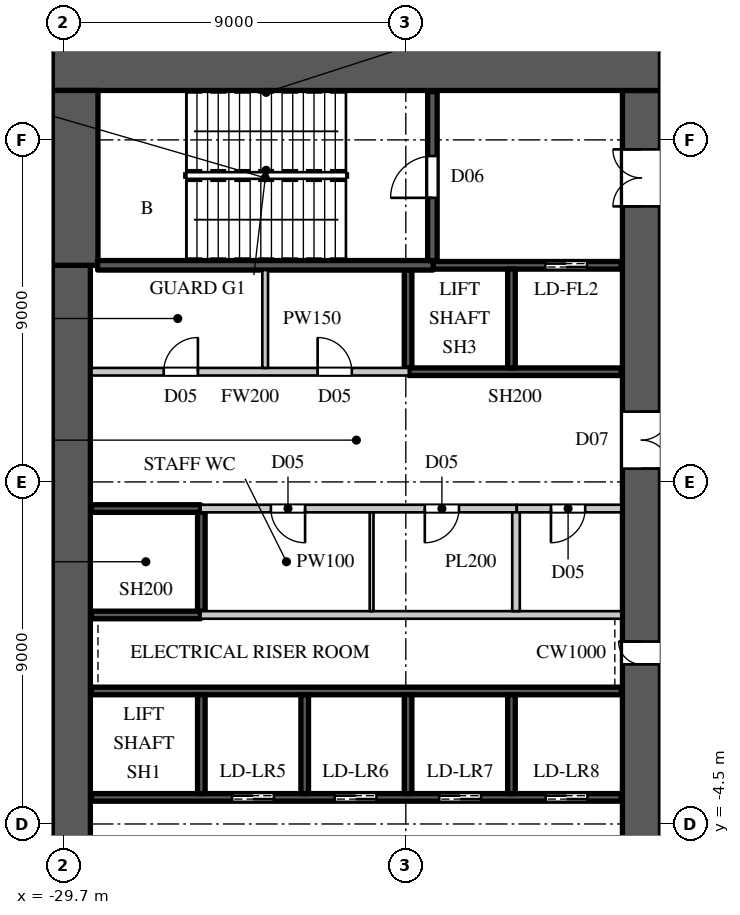
"""IFC4 building model, lengths in metres.
Left out: names, types, materials, properties, quantities, classifications, styles, units other than length and angle.
Written with IfcOpenShell. Run it as: python <this file> out.ifc"""

import sys

from ifc_helpers import new_model, si_unit, direction, frame, frame_2d, origin, place, context, subcontext, project, spatial, rectangle, extrude, element, fill, save


model = new_model("IFC4")
c1 = context("Model", 3, precision=1e-05, world=origin(), true_north=direction((0.0, 1.0)))
c2 = subcontext(c1, "Body", "Model", "MODEL_VIEW")
j1 = project(units=[si_unit("LENGTHUNIT", "METRE"), si_unit("PLANEANGLEUNIT", "RADIAN")], contexts=[c1])
p1 = place(None, origin())
s1 = spatial("IfcSite", under=j1, at=p1, CompositionType="ELEMENT")
p2 = place(p1, origin())
s2 = spatial("IfcBuilding", under=s1, at=p2, CompositionType="ELEMENT")
p3 = place(p2, frame((0.0, 0.0, 50.0)))
s3 = spatial("IfcBuildingStorey", under=s2, at=p3, CompositionType="ELEMENT", Elevation=50.0)
p4 = place(p3, frame((-30.0, 15.4, 0.0), z_axis=(0.0, 0.0, 1.0), x_axis=(1.0, 0.0, 0.0)))
e1 = element("IfcWall", 1, at=p4, inside=s3, PredefinedType="SHEAR", context=c2, shape_type="SweptSolid", body=[
    extrude(rectangle(XDim=16.0, YDim=1.2, at=frame_2d((8.0, 0.0))), origin(), (0.0, 0.0, 1.0), 5.5),
])
p5 = place(p3, frame((-14.5, -14.8, 0.0), z_axis=(0.0, 0.0, 1.0), x_axis=(0.0, 1.0, 0.0)))
e2 = element("IfcWall", 2, at=p5, inside=s3, PredefinedType="SHEAR", context=c2, shape_type="SweptSolid", body=[
    extrude(rectangle(XDim=29.6, YDim=1.0, at=frame_2d((14.8, 0.0))), origin(), (0.0, 0.0, 1.0), 5.5),
])
p6 = place(p5, frame((1.55, 0.0, 0.0)))
e3 = element("IfcOpeningElement", 3, at=p6, cuts=e2, PredefinedType="OPENING", context=c2, shape_type="SweptSolid", body=[
    extrude(rectangle(XDim=1.5, YDim=2.4, at=frame_2d((0.75, 1.2))), frame((0.0, 0.51, 0.0), z_axis=(0.0, -1.0, 0.0), x_axis=(1.0, 0.0, 0.0)), (0.0, 0.0, 1.0), 1.02),
])
p7 = place(p5, frame((26.55, 0.0, 0.0)))
e4 = element("IfcOpeningElement", 4, at=p7, cuts=e2, PredefinedType="OPENING", context=c2, shape_type="SweptSolid", body=[
    extrude(rectangle(XDim=1.5, YDim=2.4, at=frame_2d((0.75, 1.2))), frame((0.0, 0.51, 0.0), z_axis=(0.0, -1.0, 0.0), x_axis=(1.0, 0.0, 0.0)), (0.0, 0.0, 1.0), 1.02),
])
p8 = place(p5, frame((8.45, 0.0, 0.0)))
e5 = element("IfcOpeningElement", 5, at=p8, cuts=e2, PredefinedType="OPENING", context=c2, shape_type="SweptSolid", body=[
    extrude(rectangle(XDim=1.5, YDim=2.4, at=frame_2d((0.75, 1.2))), frame((0.0, 0.51, 0.0), z_axis=(0.0, -1.0, 0.0), x_axis=(1.0, 0.0, 0.0)), (0.0, 0.0, 1.0), 1.02),
])
p9 = place(p5, frame((19.65, 0.0, 0.0)))
e6 = element("IfcOpeningElement", 6, at=p9, cuts=e2, PredefinedType="OPENING", context=c2, shape_type="SweptSolid", body=[
    extrude(rectangle(XDim=1.5, YDim=2.4, at=frame_2d((0.75, 1.2))), frame((0.0, 0.51, 0.0), z_axis=(0.0, -1.0, 0.0), x_axis=(1.0, 0.0, 0.0)), (0.0, 0.0, 1.0), 1.02),
])
p10 = place(p5, frame((14.5, 0.0, 0.0)))
e7 = element("IfcOpeningElement", 7, at=p10, cuts=e2, PredefinedType="OPENING", context=c2, shape_type="SweptSolid", body=[
    extrude(rectangle(XDim=0.6, YDim=2.0, at=frame_2d((0.3, 1.0))), frame((0.0, 0.51, 0.0), z_axis=(0.0, -1.0, 0.0), x_axis=(1.0, 0.0, 0.0)), (0.0, 0.0, 1.0), 1.02),
])
p11 = place(p3, frame((-29.5, -10.2, 0.0), z_axis=(0.0, 0.0, 1.0), x_axis=(0.0, 1.0, 0.0)))
e8 = element("IfcWall", 8, at=p11, inside=s3, PredefinedType="SHEAR", context=c2, shape_type="SweptSolid", body=[
    extrude(rectangle(XDim=20.4, YDim=1.0, at=frame_2d((10.2, 0.0))), origin(), (0.0, 0.0, 1.0), 5.5),
])
p12 = place(p3, frame((-29.4, 10.2, 0.0), z_axis=(0.0, 0.0, 1.0), x_axis=(0.0, 1.0, 0.0)))
e9 = element("IfcWall", 9, at=p12, inside=s3, PredefinedType="SHEAR", context=c2, shape_type="SweptSolid", body=[
    extrude(rectangle(XDim=4.6, YDim=1.2, at=frame_2d((2.3, 0.0))), origin(), (0.0, 0.0, 1.0), 5.5),
])
p13 = place(p3, frame((-28.97, 7.4, 0.0), z_axis=(0.0, 0.0, 1.0), x_axis=(1.0, 0.0, 0.0)))
e10 = element("IfcWall", 10, at=p13, inside=s3, PredefinedType="PARTITIONING", context=c2, shape_type="SweptSolid", body=[
    extrude(rectangle(XDim=8.35, YDim=0.2, at=frame_2d((4.175, 0.0))), origin(), (0.0, 0.0, 1.0), 5.2),
])
p14 = place(p13, frame((1.9, 0.0, 0.0)))
e11 = element("IfcOpeningElement", 11, at=p14, cuts=e10, PredefinedType="OPENING", context=c2, shape_type="SweptSolid", body=[
    extrude(rectangle(XDim=0.9, YDim=2.2, at=frame_2d((0.45, 1.1))), frame((0.0, 0.11, 0.0), z_axis=(0.0, -1.0, 0.0), x_axis=(1.0, 0.0, 0.0)), (0.0, 0.0, 1.0), 0.22),
])
p15 = place(p13, frame((5.95, 0.0, 0.0)))
e12 = element("IfcOpeningElement", 12, at=p15, cuts=e10, PredefinedType="OPENING", context=c2, shape_type="SweptSolid", body=[
    extrude(rectangle(XDim=0.9, YDim=2.2, at=frame_2d((0.45, 1.1))), frame((0.0, 0.11, 0.0), z_axis=(0.0, -1.0, 0.0), x_axis=(1.0, 0.0, 0.0)), (0.0, 0.0, 1.0), 0.22),
])
p16 = place(p3, frame((-26.1, 3.8, 0.0), z_axis=(0.0, 0.0, 1.0), x_axis=(1.0, 0.0, 0.0)))
e13 = element("IfcWall", 13, at=p16, inside=s3, PredefinedType="PARTITIONING", context=c2, shape_type="SweptSolid", body=[
    extrude(rectangle(XDim=8.32, YDim=0.2, at=frame_2d((4.16, 0.0))), origin(), (0.0, 0.0, 1.0), 5.2),
])
p17 = place(p16, frame((1.85, 0.0, 0.0)))
e14 = element("IfcOpeningElement", 14, at=p17, cuts=e13, PredefinedType="OPENING", context=c2, shape_type="SweptSolid", body=[
    extrude(rectangle(XDim=0.9, YDim=2.2, at=frame_2d((0.45, 1.1))), frame((0.0, 0.11, 0.0), z_axis=(0.0, -1.0, 0.0), x_axis=(1.0, 0.0, 0.0)), (0.0, 0.0, 1.0), 0.22),
])
p18 = place(p16, frame((5.9, 0.0, 0.0)))
e15 = element("IfcOpeningElement", 15, at=p18, cuts=e13, PredefinedType="OPENING", context=c2, shape_type="SweptSolid", body=[
    extrude(rectangle(XDim=0.9, YDim=2.2, at=frame_2d((0.45, 1.1))), frame((0.0, 0.11, 0.0), z_axis=(0.0, -1.0, 0.0), x_axis=(1.0, 0.0, 0.0)), (0.0, 0.0, 1.0), 0.22),
])
p19 = place(p3, frame((-24.4, 7.5, 0.0), z_axis=(0.0, 0.0, 1.0), x_axis=(0.0, 1.0, 0.0)))
e16 = element("IfcWall", 16, at=p19, inside=s3, PredefinedType="PARTITIONING", context=c2, shape_type="SweptSolid", body=[
    extrude(rectangle(XDim=2.575, YDim=0.15, at=frame_2d((1.288, 0.0))), origin(), (0.0, 0.0, 1.0), 5.2),
])
p20 = place(p3, frame((-26.1, 1.0, 0.0), z_axis=(0.0, 0.0, 1.0), x_axis=(1.0, 0.0, 0.0)))
e17 = element("IfcWall", 17, at=p20, inside=s3, PredefinedType="PARTITIONING", context=c2, shape_type="SweptSolid", body=[
    extrude(rectangle(XDim=11.07, YDim=0.2, at=frame_2d((5.535, 0.0))), origin(), (0.0, 0.0, 1.0), 5.2),
])
p21 = place(p3, frame((-17.78, 3.8, 0.0), z_axis=(0.0, 0.0, 1.0), x_axis=(1.0, 0.0, 0.0)))
e18 = element("IfcWall", 18, at=p21, inside=s3, PredefinedType="PARTITIONING", context=c2, shape_type="SweptSolid", body=[
    extrude(rectangle(XDim=2.75, YDim=0.2, at=frame_2d((1.375, 0.0))), origin(), (0.0, 0.0, 1.0), 5.2),
])
p22 = place(p21, frame((0.9, 0.0, 0.0)))
e19 = element("IfcOpeningElement", 19, at=p22, cuts=e18, PredefinedType="OPENING", context=c2, shape_type="SweptSolid", body=[
    extrude(rectangle(XDim=0.9, YDim=2.2, at=frame_2d((0.45, 1.1))), frame((0.0, 0.11, 0.0), z_axis=(0.0, -1.0, 0.0), x_axis=(1.0, 0.0, 0.0)), (0.0, 0.0, 1.0), 0.22),
])
p23 = place(p3, frame((-17.8, 1.1, 0.0), z_axis=(0.0, 0.0, 1.0), x_axis=(0.0, 1.0, 0.0)))
e20 = element("IfcWall", 20, at=p23, inside=s3, PredefinedType="PARTITIONING", context=c2, shape_type="SweptSolid", body=[
    extrude(rectangle(XDim=2.6, YDim=0.2, at=frame_2d((1.3, 0.0))), origin(), (0.0, 0.0, 1.0), 5.2),
])
p24 = place(p3, frame((-28.97, -3.8, 0.0), z_axis=(0.0, 0.0, 1.0), x_axis=(1.0, 0.0, 0.0)))
e21 = element("IfcWall", 21, at=p24, inside=s3, PredefinedType="SHEAR", context=c2, shape_type="SweptSolid", body=[
    extrude(rectangle(XDim=13.94, YDim=0.2, at=frame_2d((6.97, 0.0))), origin(), (0.0, 0.0, 1.0), 5.2),
])
p25 = place(p24, frame((3.7, 0.0, 0.0)))
e22 = element("IfcOpeningElement", 22, at=p25, cuts=e21, PredefinedType="OPENING", context=c2, shape_type="SweptSolid", body=[
    extrude(rectangle(XDim=1.1, YDim=2.2, at=frame_2d((0.55, 1.1))), frame((0.0, 0.11, 0.0), z_axis=(0.0, -1.0, 0.0), x_axis=(1.0, 0.0, 0.0)), (0.0, 0.0, 1.0), 0.22),
])
p26 = place(p24, frame((6.4, 0.0, 0.0)))
e23 = element("IfcOpeningElement", 23, at=p26, cuts=e21, PredefinedType="OPENING", context=c2, shape_type="SweptSolid", body=[
    extrude(rectangle(XDim=1.1, YDim=2.2, at=frame_2d((0.55, 1.1))), frame((0.0, 0.11, 0.0), z_axis=(0.0, -1.0, 0.0), x_axis=(1.0, 0.0, 0.0)), (0.0, 0.0, 1.0), 0.22),
])
p27 = place(p24, frame((9.15, 0.0, 0.0)))
e24 = element("IfcOpeningElement", 24, at=p27, cuts=e21, PredefinedType="OPENING", context=c2, shape_type="SweptSolid", body=[
    extrude(rectangle(XDim=1.1, YDim=2.2, at=frame_2d((0.55, 1.1))), frame((0.0, 0.11, 0.0), z_axis=(0.0, -1.0, 0.0), x_axis=(1.0, 0.0, 0.0)), (0.0, 0.0, 1.0), 0.22),
])
p28 = place(p24, frame((11.95, 0.0, 0.0)))
e25 = element("IfcOpeningElement", 25, at=p28, cuts=e21, PredefinedType="OPENING", context=c2, shape_type="SweptSolid", body=[
    extrude(rectangle(XDim=1.1, YDim=2.2, at=frame_2d((0.55, 1.1))), frame((0.0, 0.11, 0.0), z_axis=(0.0, -1.0, 0.0), x_axis=(1.0, 0.0, 0.0)), (0.0, 0.0, 1.0), 0.22),
])
p29 = place(p3, frame((-28.97, -1.0, 0.0), z_axis=(0.0, 0.0, 1.0), x_axis=(1.0, 0.0, 0.0)))
e26 = element("IfcWall", 26, at=p29, inside=s3, PredefinedType="SHEAR", context=c2, shape_type="SweptSolid", body=[
    extrude(rectangle(XDim=13.94, YDim=0.2, at=frame_2d((6.97, 0.0))), origin(), (0.0, 0.0, 1.0), 5.2),
])
for number, where, z_axis, x_axis in (
    (27, (-28.97, 1.0, 0.0), (0.0, 0.0, 1.0), (1.0, 0.0, 0.0)),
    (28, (-28.97, 3.8, 0.0), (0.0, 0.0, 1.0), (1.0, 0.0, 0.0)),
):
    element("IfcWall", number, at=place(p3, frame(where, z_axis=z_axis, x_axis=x_axis)), inside=s3, PredefinedType="SHEAR", context=c2, shape_type="SweptSolid", body=[
        extrude(rectangle(XDim=2.87, YDim=0.2, at=frame_2d((1.435, 0.0))), origin(), (0.0, 0.0, 1.0), 5.2),
    ])
p30 = place(p3, frame((-26.08, -3.7, 0.0), z_axis=(0.0, 0.0, 1.0), x_axis=(0.0, 1.0, 0.0)))
e29 = element("IfcWall", 29, at=p30, inside=s3, PredefinedType="SHEAR", context=c2, shape_type="SweptSolid", body=[
    extrude(rectangle(XDim=2.6, YDim=0.2, at=frame_2d((1.3, 0.0))), origin(), (0.0, 0.0, 1.0), 5.5),
])
p31 = place(p3, frame((-26.08, 1.1, 0.0), z_axis=(0.0, 0.0, 1.0), x_axis=(0.0, 1.0, 0.0)))
e30 = element("IfcWall", 30, at=p31, inside=s3, PredefinedType="SHEAR", context=c2, shape_type="SweptSolid", body=[
    extrude(rectangle(XDim=2.6, YDim=0.2, at=frame_2d((1.3, 0.0))), origin(), (0.0, 0.0, 1.0), 5.2),
])
for number, where, z_axis, x_axis in (
    (31, (-23.36, -3.7, 0.0), (0.0, 0.0, 1.0), (0.0, 1.0, 0.0)),
    (32, (-20.64, -3.7, 0.0), (0.0, 0.0, 1.0), (0.0, 1.0, 0.0)),
):
    element("IfcWall", number, at=place(p3, frame(where, z_axis=z_axis, x_axis=x_axis)), inside=s3, PredefinedType="SHEAR", context=c2, shape_type="SweptSolid", body=[
        extrude(rectangle(XDim=2.6, YDim=0.2, at=frame_2d((1.3, 0.0))), origin(), (0.0, 0.0, 1.0), 5.5),
    ])
p32 = place(p3, frame((-20.64, 7.5, 0.0), z_axis=(0.0, 0.0, 1.0), x_axis=(0.0, 1.0, 0.0)))
e33 = element("IfcWall", 33, at=p32, inside=s3, PredefinedType="SHEAR", context=c2, shape_type="SweptSolid", body=[
    extrude(rectangle(XDim=2.575, YDim=0.2, at=frame_2d((1.288, 0.0))), origin(), (0.0, 0.0, 1.0), 5.2),
])
p33 = place(p3, frame((-20.62, 7.4, 0.0), z_axis=(0.0, 0.0, 1.0), x_axis=(1.0, 0.0, 0.0)))
e34 = element("IfcWall", 34, at=p33, inside=s3, PredefinedType="SHEAR", context=c2, shape_type="SweptSolid", body=[
    extrude(rectangle(XDim=5.59, YDim=0.2, at=frame_2d((2.795, 0.0))), origin(), (0.0, 0.0, 1.0), 5.2),
])
p34 = place(p3, frame((-19.98, 10.2, 0.0), z_axis=(0.0, 0.0, 1.0), x_axis=(1.0, 0.0, 0.0)))
e35 = element("IfcWall", 35, at=p34, inside=s3, PredefinedType="SHEAR", context=c2, shape_type="SweptSolid", body=[
    extrude(rectangle(XDim=4.95, YDim=0.2, at=frame_2d((2.475, 0.0))), origin(), (0.0, 0.0, 1.0), 5.2),
])
p35 = place(p34, frame((2.95, 0.0, 0.0)))
e36 = element("IfcOpeningElement", 36, at=p35, cuts=e35, PredefinedType="OPENING", context=c2, shape_type="SweptSolid", body=[
    extrude(rectangle(XDim=1.1, YDim=2.2, at=frame_2d((0.55, 1.1))), frame((0.0, 0.11, 0.0), z_axis=(0.0, -1.0, 0.0), x_axis=(1.0, 0.0, 0.0)), (0.0, 0.0, 1.0), 0.22),
])
p36 = place(p3, frame((-17.92, -3.7, 0.0), z_axis=(0.0, 0.0, 1.0), x_axis=(0.0, 1.0, 0.0)))
e37 = element("IfcWall", 37, at=p36, inside=s3, PredefinedType="SHEAR", context=c2, shape_type="SweptSolid", body=[
    extrude(rectangle(XDim=2.6, YDim=0.2, at=frame_2d((1.3, 0.0))), origin(), (0.0, 0.0, 1.0), 5.5),
])
p37 = place(p3, frame((-17.92, 7.5, 0.0), z_axis=(0.0, 0.0, 1.0), x_axis=(0.0, 1.0, 0.0)))
e38 = element("IfcWall", 38, at=p37, inside=s3, PredefinedType="SHEAR", context=c2, shape_type="SweptSolid", body=[
    extrude(rectangle(XDim=2.6, YDim=0.2, at=frame_2d((1.3, 0.0))), origin(), (0.0, 0.0, 1.0), 5.5),
])
p38 = place(p3, frame((-28.81, 10.2, 0.0), z_axis=(0.0, 0.0, 1.0), x_axis=(1.0, 0.0, 0.0)))
e39 = element("IfcWall", 39, at=p38, inside=s3, PredefinedType="SHEAR", context=c2, shape_type="SweptSolid", body=[
    extrude(rectangle(XDim=8.83, YDim=0.25, at=frame_2d((4.415, 0.0))), origin(), (0.0, 0.0, 1.0), 5.2),
])
p39 = place(p3, frame((-20.0, 10.325, 0.0), z_axis=(0.0, 0.0, 1.0), x_axis=(0.0, 1.0, 0.0)))
e40 = element("IfcWall", 40, at=p39, inside=s3, PredefinedType="SHEAR", context=c2, shape_type="SweptSolid", body=[
    extrude(rectangle(XDim=4.445, YDim=0.25, at=frame_2d((2.223, 0.0))), origin(), (0.0, 0.0, 1.0), 5.2),
])
p40 = place(p39, frame((1.65, 0.0, 0.0)))
e41 = element("IfcOpeningElement", 41, at=p40, cuts=e40, PredefinedType="OPENING", context=c2, shape_type="SweptSolid", body=[
    extrude(rectangle(XDim=1.1, YDim=2.2, at=frame_2d((0.55, 1.1))), frame((0.0, 0.135, 0.0), z_axis=(0.0, -1.0, 0.0), x_axis=(1.0, 0.0, 0.0)), (0.0, 0.0, 1.0), 0.27),
])
p41 = place(p3, frame((-21.6, 1.1, 0.0), z_axis=(0.0, 0.0, 1.0), x_axis=(0.0, 1.0, 0.0)))
e42 = element("IfcWall", 42, at=p41, inside=s3, PredefinedType="PARTITIONING", context=c2, shape_type="SweptSolid", body=[
    extrude(rectangle(XDim=2.6, YDim=0.1, at=frame_2d((1.3, 0.0))), origin(), (0.0, 0.0, 1.0), 5.2),
])
p42 = place(p40, origin())
e43 = element("IfcDoor", 43, at=p42, inside=s3, OperationType="SINGLE_SWING_LEFT", PredefinedType="DOOR", context=c2, shape_type="SweptSolid", body=[
    extrude(rectangle(XDim=1.1, YDim=2.2, at=frame_2d((0.55, 1.1))), frame((0.0, 0.025, 0.0), z_axis=(0.0, -1.0, 0.0), x_axis=(1.0, 0.0, 0.0)), (0.0, 0.0, 1.0), 0.05),
])
fill(e41, e43)
p43 = place(p17, origin())
e44 = element("IfcDoor", 44, at=p43, inside=s3, OperationType="SINGLE_SWING_LEFT", PredefinedType="DOOR", context=c2, shape_type="SweptSolid", body=[
    extrude(rectangle(XDim=0.9, YDim=2.2, at=frame_2d((0.45, 1.1))), frame((0.0, 0.025, 0.0), z_axis=(0.0, -1.0, 0.0), x_axis=(1.0, 0.0, 0.0)), (0.0, 0.0, 1.0), 0.05),
])
fill(e14, e44)
p44 = place(p18, origin())
e45 = element("IfcDoor", 45, at=p44, inside=s3, OperationType="SINGLE_SWING_RIGHT", PredefinedType="DOOR", context=c2, shape_type="SweptSolid", body=[
    extrude(rectangle(XDim=0.9, YDim=2.2, at=frame_2d((0.45, 1.1))), frame((0.0, 0.025, 0.0), z_axis=(0.0, -1.0, 0.0), x_axis=(1.0, 0.0, 0.0)), (0.0, 0.0, 1.0), 0.05),
])
fill(e15, e45)
p45 = place(p22, origin())
e46 = element("IfcDoor", 46, at=p45, inside=s3, OperationType="SINGLE_SWING_RIGHT", PredefinedType="DOOR", context=c2, shape_type="SweptSolid", body=[
    extrude(rectangle(XDim=0.9, YDim=2.2, at=frame_2d((0.45, 1.1))), frame((0.0, 0.025, 0.0), z_axis=(0.0, -1.0, 0.0), x_axis=(1.0, 0.0, 0.0)), (0.0, 0.0, 1.0), 0.05),
])
fill(e19, e46)
p46 = place(p14, origin())
e47 = element("IfcDoor", 47, at=p46, inside=s3, OperationType="SINGLE_SWING_RIGHT", PredefinedType="DOOR", context=c2, shape_type="SweptSolid", body=[
    extrude(rectangle(XDim=0.9, YDim=2.2, at=frame_2d((0.45, 1.1))), frame((0.0, 0.025, 0.0), z_axis=(0.0, -1.0, 0.0), x_axis=(1.0, 0.0, 0.0)), (0.0, 0.0, 1.0), 0.05),
])
fill(e11, e47)
p47 = place(p15, origin())
e48 = element("IfcDoor", 48, at=p47, inside=s3, OperationType="SINGLE_SWING_LEFT", PredefinedType="DOOR", context=c2, shape_type="SweptSolid", body=[
    extrude(rectangle(XDim=0.9, YDim=2.2, at=frame_2d((0.45, 1.1))), frame((0.0, 0.025, 0.0), z_axis=(0.0, -1.0, 0.0), x_axis=(1.0, 0.0, 0.0)), (0.0, 0.0, 1.0), 0.05),
])
fill(e12, e48)
p48 = place(p25, origin())
e49 = element("IfcDoor", 49, at=p48, inside=s3, OperationType="DOUBLE_DOOR_SLIDING", PredefinedType="DOOR", context=c2, shape_type="SweptSolid", body=[
    extrude(rectangle(XDim=1.1, YDim=2.2, at=frame_2d((0.55, 1.1))), frame((0.0, 0.025, 0.0), z_axis=(0.0, -1.0, 0.0), x_axis=(1.0, 0.0, 0.0)), (0.0, 0.0, 1.0), 0.05),
])
fill(e22, e49)
p49 = place(p26, origin())
e50 = element("IfcDoor", 50, at=p49, inside=s3, OperationType="DOUBLE_DOOR_SLIDING", PredefinedType="DOOR", context=c2, shape_type="SweptSolid", body=[
    extrude(rectangle(XDim=1.1, YDim=2.2, at=frame_2d((0.55, 1.1))), frame((0.0, 0.025, 0.0), z_axis=(0.0, -1.0, 0.0), x_axis=(1.0, 0.0, 0.0)), (0.0, 0.0, 1.0), 0.05),
])
fill(e23, e50)
p50 = place(p27, origin())
e51 = element("IfcDoor", 51, at=p50, inside=s3, OperationType="DOUBLE_DOOR_SLIDING", PredefinedType="DOOR", context=c2, shape_type="SweptSolid", body=[
    extrude(rectangle(XDim=1.1, YDim=2.2, at=frame_2d((0.55, 1.1))), frame((0.0, 0.025, 0.0), z_axis=(0.0, -1.0, 0.0), x_axis=(1.0, 0.0, 0.0)), (0.0, 0.0, 1.0), 0.05),
])
fill(e24, e51)
p51 = place(p28, origin())
e52 = element("IfcDoor", 52, at=p51, inside=s3, OperationType="DOUBLE_DOOR_SLIDING", PredefinedType="DOOR", context=c2, shape_type="SweptSolid", body=[
    extrude(rectangle(XDim=1.1, YDim=2.2, at=frame_2d((0.55, 1.1))), frame((0.0, 0.025, 0.0), z_axis=(0.0, -1.0, 0.0), x_axis=(1.0, 0.0, 0.0)), (0.0, 0.0, 1.0), 0.05),
])
fill(e25, e52)
p52 = place(p35, origin())
e53 = element("IfcDoor", 53, at=p52, inside=s3, OperationType="DOUBLE_DOOR_SLIDING", PredefinedType="DOOR", context=c2, shape_type="SweptSolid", body=[
    extrude(rectangle(XDim=1.1, YDim=2.2, at=frame_2d((0.55, 1.1))), frame((0.0, 0.025, 0.0), z_axis=(0.0, -1.0, 0.0), x_axis=(1.0, 0.0, 0.0)), (0.0, 0.0, 1.0), 0.05),
])
fill(e36, e53)
p53 = place(p7, origin())
e54 = element("IfcDoor", 54, at=p53, inside=s3, OperationType="DOUBLE_DOOR_SINGLE_SWING", PredefinedType="DOOR", context=c2, shape_type="SweptSolid", body=[
    extrude(rectangle(XDim=1.5, YDim=2.4, at=frame_2d((0.75, 1.2))), frame((0.0, 0.495, 0.0), z_axis=(0.0, -1.0, 0.0), x_axis=(1.0, 0.0, 0.0)), (0.0, 0.0, 1.0), 0.05),
])
fill(e4, e54)
p54 = place(p9, origin())
e55 = element("IfcDoor", 55, at=p54, inside=s3, OperationType="DOUBLE_DOOR_SINGLE_SWING", PredefinedType="DOOR", context=c2, shape_type="SweptSolid", body=[
    extrude(rectangle(XDim=1.5, YDim=2.4, at=frame_2d((0.75, 1.2))), frame((0.0, -0.445, 0.0), z_axis=(0.0, -1.0, 0.0), x_axis=(1.0, 0.0, 0.0)), (0.0, 0.0, 1.0), 0.05),
])
fill(e6, e55)
p55 = place(p10, origin())
e56 = element("IfcDoor", 56, at=p55, inside=s3, OperationType="SINGLE_SWING_RIGHT", PredefinedType="DOOR", context=c2, shape_type="SweptSolid", body=[
    extrude(rectangle(XDim=0.6, YDim=2.0, at=frame_2d((0.3, 1.0))), frame((0.0, 0.495, 0.0), z_axis=(0.0, -1.0, 0.0), x_axis=(1.0, 0.0, 0.0)), (0.0, 0.0, 1.0), 0.05),
])
fill(e7, e56)
save(model, sys.argv[1])
